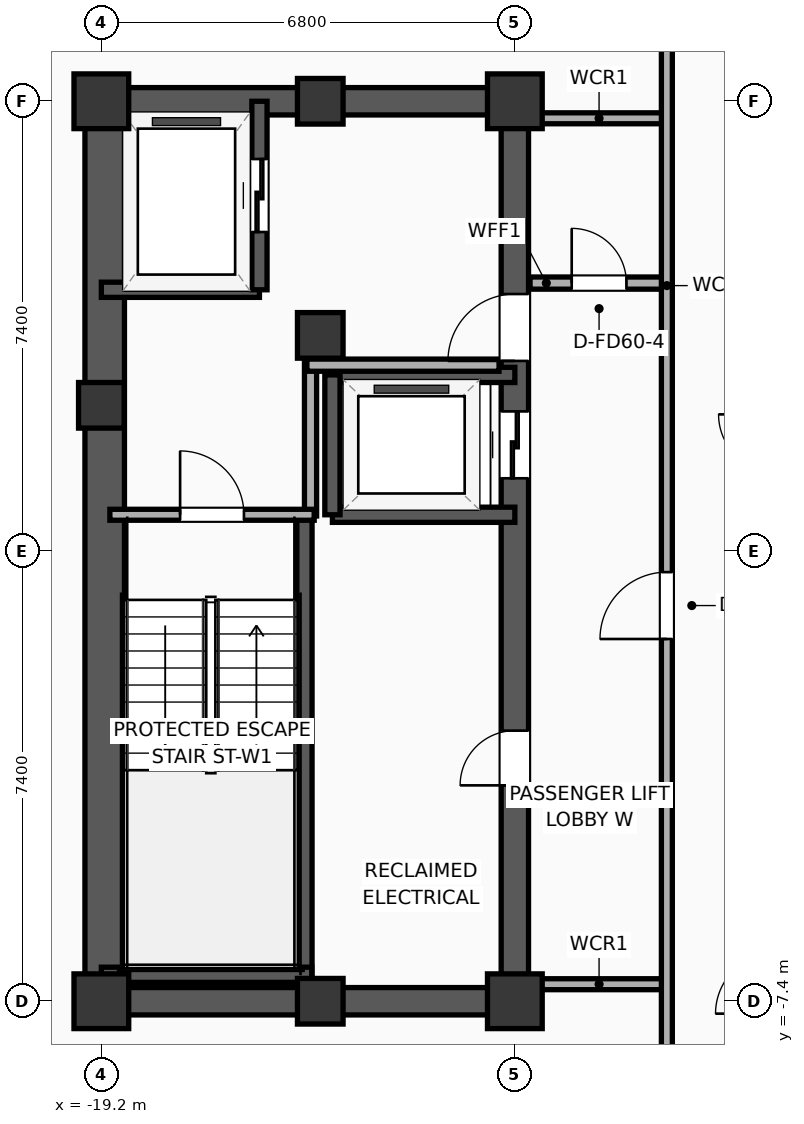
"""IFC4 building model, lengths in metres.
Left out: names, types, materials, properties, quantities, classifications, styles, units other than length and angle.
Written with IfcOpenShell. Run it as: python <this file> out.ifc"""

import sys

from ifc_helpers import new_model, si_unit, direction, frame, frame_2d, origin, origin_2d, place, context, subcontext, project, spatial, rectangle, extrude, element, fill, save


model = new_model("IFC4")
c1 = context("Model", 3, precision=1e-05, world=origin(), true_north=direction((0.0, 1.0)))
c2 = subcontext(c1, "Body", "Model", "MODEL_VIEW")
j1 = project(units=[si_unit("LENGTHUNIT", "METRE"), si_unit("PLANEANGLEUNIT", "RADIAN")], contexts=[c1])
p1 = place(None, origin())
s1 = spatial("IfcSite", under=j1, at=p1, CompositionType="ELEMENT")
p2 = place(p1, origin())
s2 = spatial("IfcBuilding", under=s1, at=p2, CompositionType="ELEMENT")
p3 = place(p2, frame((0.0, 0.0, 239.2)))
s3 = spatial("IfcBuildingStorey", under=s2, at=p3, CompositionType="ELEMENT", Elevation=239.2)
p4 = place(p3, frame((-19.2, -7.4, 0.0), z_axis=(0.0, 0.0, 1.0), x_axis=(1.0, 0.0, 0.0)))
e1 = element("IfcColumn", 1, at=p4, inside=s3, PredefinedType="COLUMN", context=c2, shape_type="SweptSolid", body=[
    extrude(rectangle(XDim=0.9, YDim=0.9, at=origin_2d()), origin(), (0.0, 0.0, 1.0), 3.9),
])
p5 = place(p3, frame((-19.2, 2.4, 0.0), z_axis=(0.0, 0.0, 1.0), x_axis=(1.0, 0.0, 0.0)))
e2 = element("IfcColumn", 2, at=p5, inside=s3, PredefinedType="COLUMN", context=c2, shape_type="SweptSolid", body=[
    extrude(rectangle(XDim=0.75, YDim=0.75, at=origin_2d()), origin(), (0.0, 0.0, 1.0), 3.9),
])
p6 = place(p3, frame((-19.2, 7.4, 0.0), z_axis=(0.0, 0.0, 1.0), x_axis=(1.0, 0.0, 0.0)))
e3 = element("IfcColumn", 3, at=p6, inside=s3, PredefinedType="COLUMN", context=c2, shape_type="SweptSolid", body=[
    extrude(rectangle(XDim=0.9, YDim=0.9, at=origin_2d()), origin(), (0.0, 0.0, 1.0), 3.9),
])
for number, where, z_axis, x_axis in (
    (4, (-15.6, -7.4, 0.0), (0.0, 0.0, 1.0), (1.0, 0.0, 0.0)),
    (5, (-15.6, 7.4, 0.0), (0.0, 0.0, 1.0), (1.0, 0.0, 0.0)),
):
    element("IfcColumn", number, at=place(p3, frame(where, z_axis=z_axis, x_axis=x_axis)), inside=s3, PredefinedType="COLUMN", context=c2, shape_type="SweptSolid", body=[
        extrude(rectangle(XDim=0.75, YDim=0.75, at=origin_2d()), origin(), (0.0, 0.0, 1.0), 3.9),
    ])
p7 = place(p3, frame((-12.4, -7.4, 0.0), z_axis=(0.0, 0.0, 1.0), x_axis=(1.0, 0.0, 0.0)))
e6 = element("IfcColumn", 6, at=p7, inside=s3, PredefinedType="COLUMN", context=c2, shape_type="SweptSolid", body=[
    extrude(rectangle(XDim=0.9, YDim=0.9, at=origin_2d()), origin(), (0.0, 0.0, 1.0), 3.9),
])
p8 = place(p3, frame((-15.6, 3.55, 0.0), z_axis=(0.0, 0.0, 1.0), x_axis=(1.0, 0.0, 0.0)))
e7 = element("IfcColumn", 7, at=p8, inside=s3, PredefinedType="COLUMN", context=c2, shape_type="SweptSolid", body=[
    extrude(rectangle(XDim=0.75, YDim=0.75, at=origin_2d()), origin(), (0.0, 0.0, 1.0), 3.9),
])
p9 = place(p3, frame((-12.4, 7.4, 0.0), z_axis=(0.0, 0.0, 1.0), x_axis=(1.0, 0.0, 0.0)))
e8 = element("IfcColumn", 8, at=p9, inside=s3, PredefinedType="COLUMN", context=c2, shape_type="SweptSolid", body=[
    extrude(rectangle(XDim=0.9, YDim=0.9, at=origin_2d()), origin(), (0.0, 0.0, 1.0), 3.9),
])
for number, where, z_axis, x_axis in (
    (9, (-19.425, -7.4, 0.0), (0.0, 0.0, 1.0), (1.0, 0.0, 0.0)),
    (10, (-19.425, 7.4, 0.0), (0.0, 0.0, 1.0), (1.0, 0.0, 0.0)),
):
    element("IfcWall", number, at=place(p3, frame(where, z_axis=z_axis, x_axis=x_axis)), inside=s3, PredefinedType="SHEAR", context=c2, shape_type="SweptSolid", body=[
        extrude(rectangle(XDim=7.25, YDim=0.45, at=frame_2d((3.625, 0.0))), origin(), (0.0, 0.0, 1.0), 3.65),
    ])
p10 = place(p3, frame((-19.145, -7.4, 0.0), z_axis=(0.0, 0.0, 1.0), x_axis=(0.0, 1.0, 0.0)))
e11 = element("IfcWall", 11, at=p10, inside=s3, PredefinedType="SHEAR", context=c2, shape_type="SweptSolid", body=[
    extrude(rectangle(XDim=14.8, YDim=0.65, at=frame_2d((7.4, 0.0))), origin(), (0.0, 0.0, 1.0), 3.65),
])
p11 = place(p3, frame((-12.4, -7.4, 0.0), z_axis=(0.0, 0.0, 1.0), x_axis=(0.0, 1.0, 0.0)))
e12 = element("IfcWall", 12, at=p11, inside=s3, PredefinedType="SHEAR", context=c2, shape_type="SweptSolid", body=[
    extrude(rectangle(XDim=14.8, YDim=0.45, at=frame_2d((7.4, 0.0))), origin(), (0.0, 0.0, 1.0), 3.65),
])
p12 = place(p11, frame((8.6, 0.0, 0.0)))
e13 = element("IfcOpeningElement", 13, at=p12, cuts=e12, PredefinedType="OPENING", context=c2, shape_type="SweptSolid", body=[
    extrude(rectangle(XDim=1.1, YDim=2.05, at=frame_2d((0.55, 1.025))), frame((0.0, 0.235, 0.0), z_axis=(0.0, -1.0, 0.0), x_axis=(1.0, 0.0, 0.0)), (0.0, 0.0, 1.0), 0.47),
])
p13 = place(p11, frame((10.53, 0.0, 0.0)))
e14 = element("IfcOpeningElement", 14, at=p13, cuts=e12, PredefinedType="OPENING", context=c2, shape_type="SweptSolid", body=[
    extrude(rectangle(XDim=1.1, YDim=2.05, at=frame_2d((0.55, 1.025))), frame((0.0, 0.235, 0.0), z_axis=(0.0, -1.0, 0.0), x_axis=(1.0, 0.0, 0.0)), (0.0, 0.0, 1.0), 0.47),
])
p14 = place(p11, frame((3.55, 0.0, 0.0)))
e15 = element("IfcOpeningElement", 15, at=p14, cuts=e12, PredefinedType="OPENING", context=c2, shape_type="SweptSolid", body=[
    extrude(rectangle(XDim=0.9, YDim=2.05, at=frame_2d((0.45, 1.025))), frame((0.0, 0.235, 0.0), z_axis=(0.0, -1.0, 0.0), x_axis=(1.0, 0.0, 0.0)), (0.0, 0.0, 1.0), 0.47),
])
p15 = place(p3, frame((-15.86, -7.085, 0.0), z_axis=(0.0, 0.0, 1.0), x_axis=(0.0, 1.0, 0.0)))
e16 = element("IfcWall", 16, at=p15, inside=s3, PredefinedType="SOLIDWALL", context=c2, shape_type="SweptSolid", body=[
    extrude(rectangle(XDim=7.685, YDim=0.25, at=frame_2d((3.843, 0.0))), origin(), (0.0, 0.0, 1.0), 3.65),
])
p16 = place(p3, frame((-19.2, -6.965, 0.0), z_axis=(0.0, 0.0, 1.0), x_axis=(1.0, 0.0, 0.0)))
e17 = element("IfcWall", 17, at=p16, inside=s3, PredefinedType="SOLIDWALL", context=c2, shape_type="SweptSolid", body=[
    extrude(rectangle(XDim=3.46, YDim=0.25, at=frame_2d((1.73, 0.0))), origin(), (0.0, 0.0, 1.0), 3.65),
])
p17 = place(p3, frame((-19.2, 4.3, 0.0), z_axis=(0.0, 0.0, 1.0), x_axis=(1.0, 0.0, 0.0)))
e18 = element("IfcWall", 18, at=p17, inside=s3, PredefinedType="SOLIDWALL", context=c2, shape_type="SweptSolid", body=[
    extrude(rectangle(XDim=2.6, YDim=0.25, at=frame_2d((1.3, 0.0))), origin(), (0.0, 0.0, 1.0), 3.65),
])
p18 = place(p3, frame((-16.6, 4.3, 0.0), z_axis=(0.0, 0.0, 1.0), x_axis=(0.0, 1.0, 0.0)))
e19 = element("IfcWall", 19, at=p18, inside=s3, PredefinedType="SOLIDWALL", context=c2, shape_type="SweptSolid", body=[
    extrude(rectangle(XDim=3.1, YDim=0.25, at=frame_2d((1.55, 0.0))), origin(), (0.0, 0.0, 1.0), 3.65),
])
p19 = place(p18, frame((0.95, 0.0, 0.0)))
e20 = element("IfcOpeningElement", 20, at=p19, cuts=e19, PredefinedType="OPENING", context=c2, shape_type="SweptSolid", body=[
    extrude(rectangle(XDim=1.2, YDim=2.05, at=frame_2d((0.6, 1.025))), frame((0.0, 0.135, 0.0), z_axis=(0.0, -1.0, 0.0), x_axis=(1.0, 0.0, 0.0)), (0.0, 0.0, 1.0), 0.27),
])
for number, where, z_axis, x_axis in (
    (21, (-15.4, 0.6, 0.0), (0.0, 0.0, 1.0), (1.0, 0.0, 0.0)),
    (22, (-12.4, 2.9, 0.0), (0.0, 0.0, 1.0), (-1.0, 0.0, 0.0)),
):
    element("IfcWall", number, at=place(p3, frame(where, z_axis=z_axis, x_axis=x_axis)), inside=s3, PredefinedType="SOLIDWALL", context=c2, shape_type="SweptSolid", body=[
        extrude(rectangle(XDim=3.0, YDim=0.25, at=frame_2d((1.5, 0.0))), origin(), (0.0, 0.0, 1.0), 3.65),
    ])
p20 = place(p3, frame((-15.4, 2.9, 0.0), z_axis=(0.0, 0.0, 1.0), x_axis=(0.0, -1.0, 0.0)))
e23 = element("IfcWall", 23, at=p20, inside=s3, PredefinedType="SOLIDWALL", context=c2, shape_type="SweptSolid", body=[
    extrude(rectangle(XDim=2.3, YDim=0.25, at=frame_2d((1.15, 0.0))), origin(), (0.0, 0.0, 1.0), 3.65),
])
p21 = place(p3, frame((-15.76, 0.58, 0.0), z_axis=(0.0, 0.0, 1.0), x_axis=(0.0, 1.0, 0.0)))
e24 = element("IfcWall", 24, at=p21, inside=s3, PredefinedType="PARTITIONING", context=c2, shape_type="SweptSolid", body=[
    extrude(rectangle(XDim=2.52, YDim=0.2, at=frame_2d((1.26, 0.0))), origin(), (0.0, 0.0, 1.0), 3.65),
])
p22 = place(p3, frame((-15.82, 3.06, 0.0), z_axis=(0.0, 0.0, 1.0), x_axis=(1.0, 0.0, 0.0)))
e25 = element("IfcWall", 25, at=p22, inside=s3, PredefinedType="PARTITIONING", context=c2, shape_type="SweptSolid", body=[
    extrude(rectangle(XDim=3.16, YDim=0.2, at=frame_2d((1.58, 0.0))), origin(), (0.0, 0.0, 1.0), 3.65),
])
p23 = place(p3, frame((-19.06, 0.6, 0.0), z_axis=(0.0, 0.0, 1.0), x_axis=(1.0, 0.0, 0.0)))
e26 = element("IfcWall", 26, at=p23, inside=s3, PredefinedType="PARTITIONING", context=c2, shape_type="SweptSolid", body=[
    extrude(rectangle(XDim=3.36, YDim=0.18, at=frame_2d((1.68, 0.0))), origin(), (0.0, 0.0, 1.0), 3.65),
])
p24 = place(p23, frame((1.155, 0.0, 0.0)))
e27 = element("IfcOpeningElement", 27, at=p24, cuts=e26, PredefinedType="OPENING", context=c2, shape_type="SweptSolid", body=[
    extrude(rectangle(XDim=1.05, YDim=2.05, at=frame_2d((0.525, 1.025))), frame((0.0, 0.1, 0.0), z_axis=(0.0, -1.0, 0.0), x_axis=(1.0, 0.0, 0.0)), (0.0, 0.0, 1.0), 0.2),
])
p25 = place(p3, frame((-12.15, 4.41, 0.0), z_axis=(0.0, 0.0, 1.0), x_axis=(1.0, 0.0, 0.0)))
e28 = element("IfcWall", 28, at=p25, inside=s3, PredefinedType="PARTITIONING", context=c2, shape_type="SweptSolid", body=[
    extrude(rectangle(XDim=2.27, YDim=0.2, at=frame_2d((1.135, 0.0))), origin(), (0.0, 0.0, 1.0), 3.65),
])
p26 = place(p25, frame((0.685, 0.0, 0.0)))
e29 = element("IfcOpeningElement", 29, at=p26, cuts=e28, PredefinedType="OPENING", context=c2, shape_type="SweptSolid", body=[
    extrude(rectangle(XDim=0.9, YDim=2.05, at=frame_2d((0.45, 1.025))), frame((0.0, 0.11, 0.0), z_axis=(0.0, -1.0, 0.0), x_axis=(1.0, 0.0, 0.0)), (0.0, 0.0, 1.0), 0.22),
])
for number, where, z_axis, x_axis in (
    (30, (-12.15, 7.12, 0.0), (0.0, 0.0, 1.0), (1.0, 0.0, 0.0)),
    (31, (-12.15, -7.12, 0.0), (0.0, 0.0, 1.0), (1.0, 0.0, 0.0)),
):
    element("IfcWall", number, at=place(p3, frame(where, z_axis=z_axis, x_axis=x_axis)), inside=s3, PredefinedType="PARTITIONING", context=c2, shape_type="SweptSolid", body=[
        extrude(rectangle(XDim=2.27, YDim=0.18, at=frame_2d((1.135, 0.0))), origin(), (0.0, 0.0, 1.0), 3.65),
    ])
p27 = place(p3, frame((-9.9, -8.93, 0.0), z_axis=(0.0, 0.0, 1.0), x_axis=(0.0, 1.0, 0.0)))
e32 = element("IfcWall", 32, at=p27, inside=s3, PredefinedType="PARTITIONING", context=c2, shape_type="SweptSolid", body=[
    extrude(rectangle(XDim=17.86, YDim=0.18, at=frame_2d((8.93, 0.0))), origin(), (0.0, 0.0, 1.0), 3.65),
])
p28 = place(p27, frame((7.487, 0.0, 0.0)))
e33 = element("IfcOpeningElement", 33, at=p28, cuts=e32, PredefinedType="OPENING", context=c2, shape_type="SweptSolid", body=[
    extrude(rectangle(XDim=1.1, YDim=2.05, at=frame_2d((0.55, 1.025))), frame((0.0, 0.1, 0.0), z_axis=(0.0, -1.0, 0.0), x_axis=(1.0, 0.0, 0.0)), (0.0, 0.0, 1.0), 0.2),
])
p29 = place(p19, origin())
e34 = element("IfcDoor", 34, at=p29, inside=s3, OperationType="SLIDING_TO_LEFT", PredefinedType="DOOR", context=c2, shape_type="SweptSolid", body=[
    extrude(rectangle(XDim=1.2, YDim=2.05, at=frame_2d((0.6, 1.025))), frame((0.0, 0.025, 0.0), z_axis=(0.0, -1.0, 0.0), x_axis=(1.0, 0.0, 0.0)), (0.0, 0.0, 1.0), 0.05),
])
fill(e20, e34)
p30 = place(p12, origin())
e35 = element("IfcDoor", 35, at=p30, inside=s3, OperationType="SLIDING_TO_LEFT", PredefinedType="DOOR", context=c2, shape_type="SweptSolid", body=[
    extrude(rectangle(XDim=1.1, YDim=2.05, at=frame_2d((0.55, 1.025))), frame((0.0, 0.025, 0.0), z_axis=(0.0, -1.0, 0.0), x_axis=(1.0, 0.0, 0.0)), (0.0, 0.0, 1.0), 0.05),
])
fill(e13, e35)
p31 = place(p24, origin())
e36 = element("IfcDoor", 36, at=p31, inside=s3, OperationType="SINGLE_SWING_LEFT", PredefinedType="DOOR", context=c2, shape_type="SweptSolid", body=[
    extrude(rectangle(XDim=1.05, YDim=2.05, at=frame_2d((0.525, 1.025))), frame((0.0, 0.025, 0.0), z_axis=(0.0, -1.0, 0.0), x_axis=(1.0, 0.0, 0.0)), (0.0, 0.0, 1.0), 0.05),
])
fill(e27, e36)
p32 = place(p26, origin())
e37 = element("IfcDoor", 37, at=p32, inside=s3, OperationType="SINGLE_SWING_LEFT", PredefinedType="DOOR", context=c2, shape_type="SweptSolid", body=[
    extrude(rectangle(XDim=0.9, YDim=2.05, at=frame_2d((0.45, 1.025))), frame((0.0, 0.025, 0.0), z_axis=(0.0, -1.0, 0.0), x_axis=(1.0, 0.0, 0.0)), (0.0, 0.0, 1.0), 0.05),
])
fill(e29, e37)
p33 = place(p28, origin())
e38 = element("IfcDoor", 38, at=p33, inside=s3, OperationType="SINGLE_SWING_LEFT", PredefinedType="DOOR", context=c2, shape_type="SweptSolid", body=[
    extrude(rectangle(XDim=1.1, YDim=2.05, at=frame_2d((0.55, 1.025))), frame((0.0, 0.025, 0.0), z_axis=(0.0, -1.0, 0.0), x_axis=(1.0, 0.0, 0.0)), (0.0, 0.0, 1.0), 0.05),
])
fill(e33, e38)
p34 = place(p13, origin())
e39 = element("IfcDoor", 39, at=p34, inside=s3, OperationType="SINGLE_SWING_LEFT", PredefinedType="DOOR", context=c2, shape_type="SweptSolid", body=[
    extrude(rectangle(XDim=1.1, YDim=2.05, at=frame_2d((0.55, 1.025))), frame((0.0, 0.025, 0.0), z_axis=(0.0, -1.0, 0.0), x_axis=(1.0, 0.0, 0.0)), (0.0, 0.0, 1.0), 0.05),
])
fill(e14, e39)
p35 = place(p14, origin())
e40 = element("IfcDoor", 40, at=p35, inside=s3, OperationType="SINGLE_SWING_LEFT", PredefinedType="DOOR", context=c2, shape_type="SweptSolid", body=[
    extrude(rectangle(XDim=0.9, YDim=2.05, at=frame_2d((0.45, 1.025))), frame((0.0, 0.025, 0.0), z_axis=(0.0, -1.0, 0.0), x_axis=(1.0, 0.0, 0.0)), (0.0, 0.0, 1.0), 0.05),
])
fill(e15, e40)
save(model, sys.argv[1])
